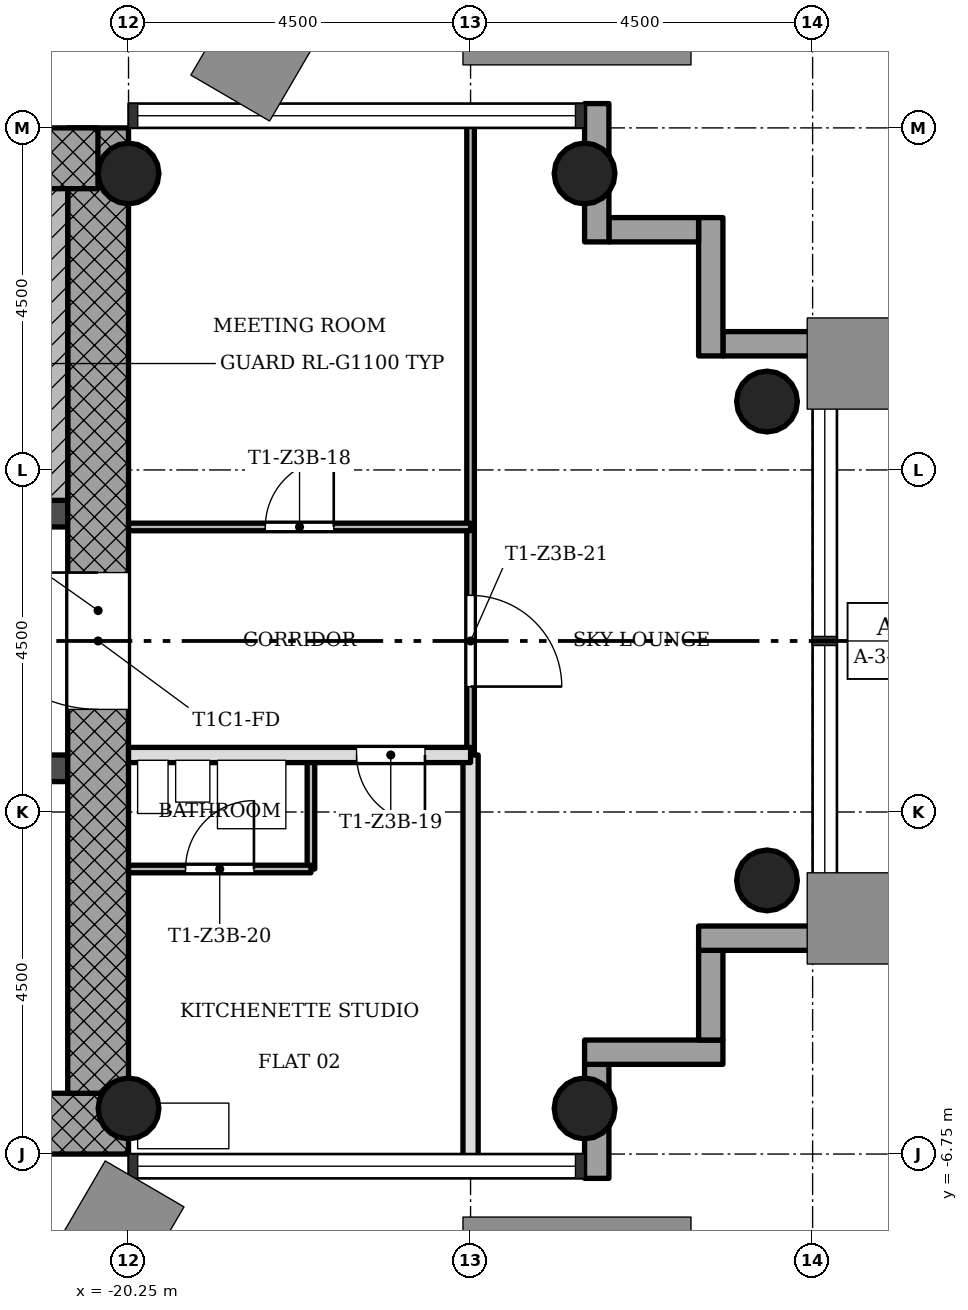
"""IFC4 building model, lengths in metres.
Left out: names, types, materials, properties, quantities, classifications, styles, units other than length and angle.
Written with IfcOpenShell. Run it as: python <this file> out.ifc"""

import sys

from ifc_helpers import new_model, si_unit, direction, frame, frame_2d, origin, origin_2d, place, context, subcontext, project, spatial, rectangle, hollow_circle, extrude, element, fill, save


model = new_model("IFC4")
c1 = context("Model", 3, precision=1e-05, world=origin(), true_north=direction((0.0, 1.0)))
c2 = subcontext(c1, "Body", "Model", "MODEL_VIEW")
j1 = project(units=[si_unit("LENGTHUNIT", "METRE"), si_unit("PLANEANGLEUNIT", "RADIAN")], contexts=[c1])
p1 = place(None, origin())
s1 = spatial("IfcSite", under=j1, at=p1, CompositionType="ELEMENT")
p2 = place(p1, origin())
s2 = spatial("IfcBuilding", under=s1, at=p2, CompositionType="ELEMENT")
p3 = place(p2, frame((0.0, 0.0, 143.9)))
s3 = spatial("IfcBuildingStorey", under=s2, at=p3, CompositionType="ELEMENT", Elevation=143.9)
p4 = place(p3, frame((-28.45, -6.35, 0.0), z_axis=(0.0, 0.0, 1.0), x_axis=(1.0, 0.0, 0.0)))
e1 = element("IfcWall", 1, at=p4, inside=s3, PredefinedType="SHEAR", context=c2, shape_type="SweptSolid", body=[
    extrude(rectangle(XDim=8.2, YDim=0.8, at=frame_2d((4.1, 0.0))), origin(), (0.0, 0.0, 1.0), 3.4),
])
p5 = place(p3, frame((-20.65, -5.95, 0.0), z_axis=(0.0, 0.0, 1.0), x_axis=(0.0, 1.0, 0.0)))
e2 = element("IfcWall", 2, at=p5, inside=s3, PredefinedType="SHEAR", context=c2, shape_type="SweptSolid", body=[
    extrude(rectangle(XDim=12.7, YDim=0.8, at=frame_2d((6.35, 0.0))), origin(), (0.0, 0.0, 1.0), 3.4),
])
p6 = place(p5, frame((5.05, 0.0, 0.0)))
e3 = element("IfcOpeningElement", 3, at=p6, cuts=e2, PredefinedType="OPENING", context=c2, shape_type="SweptSolid", body=[
    extrude(rectangle(XDim=1.8, YDim=2.1, at=frame_2d((0.9, 1.05))), frame((0.0, 0.41, 0.0), z_axis=(0.0, -1.0, 0.0), x_axis=(1.0, 0.0, 0.0)), (0.0, 0.0, 1.0), 0.82),
])
p7 = place(p3, frame((-20.652, 6.35, 0.0), z_axis=(0.0, 0.0, 1.0), x_axis=(-1.0, 0.0, 0.0)))
e4 = element("IfcWall", 4, at=p7, inside=s3, PredefinedType="SHEAR", context=c2, shape_type="SweptSolid", body=[
    extrude(rectangle(XDim=8.796, YDim=0.8, at=frame_2d((4.398, 0.0))), origin(), (0.0, 0.0, 1.0), 3.4),
])
p8 = place(p3, frame((-28.45, -1.675, 0.0), z_axis=(0.0, 0.0, 1.0), x_axis=(1.0, 0.0, 0.0)))
e5 = element("IfcWall", 5, at=p8, inside=s3, PredefinedType="SHEAR", context=c2, shape_type="SweptSolid", body=[
    extrude(rectangle(XDim=7.4, YDim=0.35, at=frame_2d((3.7, 0.0))), origin(), (0.0, 0.0, 1.0), 3.4),
])
p9 = place(p8, frame((0.95, 0.0, 0.0)))
e6 = element("IfcOpeningElement", 6, at=p9, cuts=e5, PredefinedType="OPENING", context=c2, shape_type="SweptSolid", body=[
    extrude(rectangle(XDim=1.1, YDim=2.1, at=frame_2d((0.55, 1.05))), frame((0.0, 0.185, 0.0), z_axis=(0.0, -1.0, 0.0), x_axis=(1.0, 0.0, 0.0)), (0.0, 0.0, 1.0), 0.37),
])
p10 = place(p8, frame((3.15, 0.0, 0.0)))
e7 = element("IfcOpeningElement", 7, at=p10, cuts=e5, PredefinedType="OPENING", context=c2, shape_type="SweptSolid", body=[
    extrude(rectangle(XDim=1.1, YDim=2.1, at=frame_2d((0.55, 1.05))), frame((0.0, 0.185, 0.0), z_axis=(0.0, -1.0, 0.0), x_axis=(1.0, 0.0, 0.0)), (0.0, 0.0, 1.0), 0.37),
])
p11 = place(p8, frame((5.35, 0.0, 0.0)))
e8 = element("IfcOpeningElement", 8, at=p11, cuts=e5, PredefinedType="OPENING", context=c2, shape_type="SweptSolid", body=[
    extrude(rectangle(XDim=1.1, YDim=2.1, at=frame_2d((0.55, 1.05))), frame((0.0, 0.185, 0.0), z_axis=(0.0, -1.0, 0.0), x_axis=(1.0, 0.0, 0.0)), (0.0, 0.0, 1.0), 0.37),
])
p12 = place(p3, frame((-28.45, 1.675, 0.0), z_axis=(0.0, 0.0, 1.0), x_axis=(1.0, 0.0, 0.0)))
e9 = element("IfcWall", 9, at=p12, inside=s3, PredefinedType="SHEAR", context=c2, shape_type="SweptSolid", body=[
    extrude(rectangle(XDim=7.4, YDim=0.35, at=frame_2d((3.7, 0.0))), origin(), (0.0, 0.0, 1.0), 3.4),
])
p13 = place(p12, frame((0.85, 0.0, 0.0)))
e10 = element("IfcOpeningElement", 10, at=p13, cuts=e9, PredefinedType="OPENING", context=c2, shape_type="SweptSolid", body=[
    extrude(rectangle(XDim=0.9, YDim=2.1, at=frame_2d((0.45, 1.05))), frame((0.0, 0.185, 0.0), z_axis=(0.0, -1.0, 0.0), x_axis=(1.0, 0.0, 0.0)), (0.0, 0.0, 1.0), 0.37),
])
for number, where, z_axis, x_axis in (
    (11, (-20.25, -6.15, 0.0), (0.0, 0.0, 1.0), (1.0, 0.0, 0.0)),
    (12, (-20.25, 6.15, 0.0), (0.0, 0.0, 1.0), (1.0, 0.0, 0.0)),
    (13, (-14.25, -6.15, 0.0), (0.0, 0.0, 1.0), (1.0, 0.0, 0.0)),
    (14, (-14.25, 6.15, 0.0), (0.0, 0.0, 1.0), (1.0, 0.0, 0.0)),
    (15, (-11.85, -3.15, 0.0), (0.0, 0.0, 1.0), (1.0, 0.0, 0.0)),
    (16, (-11.85, 3.15, 0.0), (0.0, 0.0, 1.0), (1.0, 0.0, 0.0)),
):
    element("IfcColumn", number, at=place(p3, frame(where, z_axis=z_axis, x_axis=x_axis)), inside=s3, PredefinedType="COLUMN", context=c2, shape_type="SweptSolid", body=[
        extrude(hollow_circle(Radius=0.4, WallThickness=0.028, at=origin_2d()), origin(), (0.0, 0.0, 1.0), 3.4),
    ])
p14 = place(p3, frame((-14.09, -7.07, -0.3), z_axis=(0.0, 0.0, 1.0), x_axis=(0.0, 1.0, 0.0)))
e17 = element("IfcWall", 17, at=p14, inside=s3, PredefinedType="STANDARD", context=c2, shape_type="SweptSolid", body=[
    extrude(rectangle(XDim=1.5, YDim=0.32, at=frame_2d((0.75, 0.0))), origin(), (0.0, 0.0, 1.0), 3.4),
])
p15 = place(p3, frame((-14.25, -5.41, -0.3), z_axis=(0.0, 0.0, 1.0), x_axis=(1.0, 0.0, 0.0)))
e18 = element("IfcWall", 18, at=p15, inside=s3, PredefinedType="STANDARD", context=c2, shape_type="SweptSolid", body=[
    extrude(rectangle(XDim=1.82, YDim=0.32, at=frame_2d((0.91, 0.0))), origin(), (0.0, 0.0, 1.0), 3.4),
])
p16 = place(p3, frame((-12.59, -5.25, -0.3), z_axis=(0.0, 0.0, 1.0), x_axis=(0.0, 1.0, 0.0)))
e19 = element("IfcWall", 19, at=p16, inside=s3, PredefinedType="STANDARD", context=c2, shape_type="SweptSolid", body=[
    extrude(rectangle(XDim=1.18, YDim=0.32, at=frame_2d((0.59, 0.0))), origin(), (0.0, 0.0, 1.0), 3.4),
])
p17 = place(p3, frame((-12.75, -3.91, -0.3), z_axis=(0.0, 0.0, 1.0), x_axis=(1.0, 0.0, 0.0)))
e20 = element("IfcWall", 20, at=p17, inside=s3, PredefinedType="STANDARD", context=c2, shape_type="SweptSolid", body=[
    extrude(rectangle(XDim=1.82, YDim=0.32, at=frame_2d((0.91, 0.0))), origin(), (0.0, 0.0, 1.0), 3.4),
])
p18 = place(p3, frame((-10.93, 3.91, -0.3), z_axis=(0.0, 0.0, 1.0), x_axis=(-1.0, 0.0, 0.0)))
e21 = element("IfcWall", 21, at=p18, inside=s3, PredefinedType="STANDARD", context=c2, shape_type="SweptSolid", body=[
    extrude(rectangle(XDim=1.5, YDim=0.32, at=frame_2d((0.75, 0.0))), origin(), (0.0, 0.0, 1.0), 3.4),
])
p19 = place(p3, frame((-12.59, 3.75, -0.3), z_axis=(0.0, 0.0, 1.0), x_axis=(0.0, 1.0, 0.0)))
e22 = element("IfcWall", 22, at=p19, inside=s3, PredefinedType="STANDARD", context=c2, shape_type="SweptSolid", body=[
    extrude(rectangle(XDim=1.82, YDim=0.32, at=frame_2d((0.91, 0.0))), origin(), (0.0, 0.0, 1.0), 3.4),
])
p20 = place(p3, frame((-12.75, 5.41, -0.3), z_axis=(0.0, 0.0, 1.0), x_axis=(-1.0, 0.0, 0.0)))
e23 = element("IfcWall", 23, at=p20, inside=s3, PredefinedType="STANDARD", context=c2, shape_type="SweptSolid", body=[
    extrude(rectangle(XDim=1.18, YDim=0.32, at=frame_2d((0.59, 0.0))), origin(), (0.0, 0.0, 1.0), 3.4),
])
p21 = place(p3, frame((-14.09, 5.25, -0.3), z_axis=(0.0, 0.0, 1.0), x_axis=(0.0, 1.0, 0.0)))
e24 = element("IfcWall", 24, at=p21, inside=s3, PredefinedType="STANDARD", context=c2, shape_type="SweptSolid", body=[
    extrude(rectangle(XDim=1.82, YDim=0.32, at=frame_2d((0.91, 0.0))), origin(), (0.0, 0.0, 1.0), 3.4),
])
p22 = place(p3, frame((-17.85, -3.0, 0.0), z_axis=(0.0, 0.0, 1.0), x_axis=(0.0, 1.0, 0.0)))
e25 = element("IfcWall", 25, at=p22, inside=s3, PredefinedType="PARTITIONING", context=c2, shape_type="SweptSolid", body=[
    extrude(rectangle(XDim=1.5, YDim=0.1, at=frame_2d((0.75, 0.0))), origin(), (0.0, 0.0, 1.0), 3.0),
])
p23 = place(p3, frame((-15.75, -1.5, 0.0), z_axis=(0.0, 0.0, 1.0), x_axis=(0.0, 1.0, 0.0)))
e26 = element("IfcWall", 26, at=p23, inside=s3, PredefinedType="PARTITIONING", context=c2, shape_type="SweptSolid", body=[
    extrude(rectangle(XDim=8.35, YDim=0.1, at=frame_2d((4.175, 0.0))), origin(), (0.0, 0.0, 1.0), 3.0),
])
p24 = place(p23, frame((0.9, 0.0, 0.0)))
e27 = element("IfcOpeningElement", 27, at=p24, cuts=e26, PredefinedType="OPENING", context=c2, shape_type="SweptSolid", body=[
    extrude(rectangle(XDim=1.2, YDim=2.1, at=frame_2d((0.6, 1.05))), frame((0.0, 0.06, 0.0), z_axis=(0.0, -1.0, 0.0), x_axis=(1.0, 0.0, 0.0)), (0.0, 0.0, 1.0), 0.12),
])
p25 = place(p3, frame((-15.75, -6.85, 0.0), z_axis=(0.0, 0.0, 1.0), x_axis=(0.0, 1.0, 0.0)))
e28 = element("IfcWall", 28, at=p25, inside=s3, PredefinedType="SOLIDWALL", context=c2, shape_type="SweptSolid", body=[
    extrude(rectangle(XDim=5.35, YDim=0.2, at=frame_2d((2.675, 0.0))), origin(), (0.0, 0.0, 1.0), 3.0),
])
p26 = place(p3, frame((-20.25, -3.0, 0.0), z_axis=(0.0, 0.0, 1.0), x_axis=(1.0, 0.0, 0.0)))
e29 = element("IfcWall", 29, at=p26, inside=s3, PredefinedType="PARTITIONING", context=c2, shape_type="SweptSolid", body=[
    extrude(rectangle(XDim=2.4, YDim=0.1, at=frame_2d((1.2, 0.0))), origin(), (0.0, 0.0, 1.0), 3.0),
])
p27 = place(p26, frame((0.75, 0.0, 0.0)))
e30 = element("IfcOpeningElement", 30, at=p27, cuts=e29, PredefinedType="OPENING", context=c2, shape_type="SweptSolid", body=[
    extrude(rectangle(XDim=0.9, YDim=2.1, at=frame_2d((0.45, 1.05))), frame((0.0, 0.06, 0.0), z_axis=(0.0, -1.0, 0.0), x_axis=(1.0, 0.0, 0.0)), (0.0, 0.0, 1.0), 0.12),
])
p28 = place(p3, frame((-20.25, -1.5, 0.0), z_axis=(0.0, 0.0, 1.0), x_axis=(1.0, 0.0, 0.0)))
e31 = element("IfcWall", 31, at=p28, inside=s3, PredefinedType="SOLIDWALL", context=c2, shape_type="SweptSolid", body=[
    extrude(rectangle(XDim=4.5, YDim=0.2, at=frame_2d((2.25, 0.0))), origin(), (0.0, 0.0, 1.0), 3.0),
])
p29 = place(p28, frame((3.0, 0.0, 0.0)))
e32 = element("IfcOpeningElement", 32, at=p29, cuts=e31, PredefinedType="OPENING", context=c2, shape_type="SweptSolid", body=[
    extrude(rectangle(XDim=0.9, YDim=2.1, at=frame_2d((0.45, 1.05))), frame((0.0, 0.11, 0.0), z_axis=(0.0, -1.0, 0.0), x_axis=(1.0, 0.0, 0.0)), (0.0, 0.0, 1.0), 0.22),
])
p30 = place(p3, frame((-20.25, 1.5, 0.0), z_axis=(0.0, 0.0, 1.0), x_axis=(1.0, 0.0, 0.0)))
e33 = element("IfcWall", 33, at=p30, inside=s3, PredefinedType="PARTITIONING", context=c2, shape_type="SweptSolid", body=[
    extrude(rectangle(XDim=4.5, YDim=0.1, at=frame_2d((2.25, 0.0))), origin(), (0.0, 0.0, 1.0), 3.0),
])
p31 = place(p30, frame((1.8, 0.0, 0.0)))
e34 = element("IfcOpeningElement", 34, at=p31, cuts=e33, PredefinedType="OPENING", context=c2, shape_type="SweptSolid", body=[
    extrude(rectangle(XDim=0.9, YDim=2.1, at=frame_2d((0.45, 1.05))), frame((0.0, 0.06, 0.0), z_axis=(0.0, -1.0, 0.0), x_axis=(1.0, 0.0, 0.0)), (0.0, 0.0, 1.0), 0.12),
])
p32 = place(p3, frame((-21.25, 1.85, 0.0), z_axis=(0.0, 0.0, 1.0), x_axis=(0.0, 1.0, 0.0)))
e35 = element("IfcWall", 35, at=p32, inside=s3, PredefinedType="SHEAR", context=c2, shape_type="SweptSolid", body=[
    extrude(rectangle(XDim=4.1, YDim=0.4, at=frame_2d((2.05, 0.0))), origin(), (0.0, 0.0, 1.0), 3.4),
])
p33 = place(p31, origin())
e36 = element("IfcDoor", 36, at=p33, inside=s3, OperationType="SINGLE_SWING_LEFT", PredefinedType="DOOR", context=c2, shape_type="SweptSolid", body=[
    extrude(rectangle(XDim=0.9, YDim=2.1, at=frame_2d((0.45, 1.05))), frame((0.0, 0.025, 0.0), z_axis=(0.0, -1.0, 0.0), x_axis=(1.0, 0.0, 0.0)), (0.0, 0.0, 1.0), 0.05),
])
fill(e34, e36)
p34 = place(p29, origin())
e37 = element("IfcDoor", 37, at=p34, inside=s3, OperationType="SINGLE_SWING_RIGHT", PredefinedType="DOOR", context=c2, shape_type="SweptSolid", body=[
    extrude(rectangle(XDim=0.9, YDim=2.1, at=frame_2d((0.45, 1.05))), frame((0.0, 0.025, 0.0), z_axis=(0.0, -1.0, 0.0), x_axis=(1.0, 0.0, 0.0)), (0.0, 0.0, 1.0), 0.05),
])
fill(e32, e37)
p35 = place(p27, origin())
e38 = element("IfcDoor", 38, at=p35, inside=s3, OperationType="SINGLE_SWING_LEFT", PredefinedType="DOOR", context=c2, shape_type="SweptSolid", body=[
    extrude(rectangle(XDim=0.9, YDim=2.1, at=frame_2d((0.45, 1.05))), frame((0.0, 0.025, 0.0), z_axis=(0.0, -1.0, 0.0), x_axis=(1.0, 0.0, 0.0)), (0.0, 0.0, 1.0), 0.05),
])
fill(e30, e38)
p36 = place(p24, origin())
e39 = element("IfcDoor", 39, at=p36, inside=s3, OperationType="SINGLE_SWING_LEFT", PredefinedType="DOOR", context=c2, shape_type="SweptSolid", body=[
    extrude(rectangle(XDim=1.2, YDim=2.1, at=frame_2d((0.6, 1.05))), frame((0.0, 0.025, 0.0), z_axis=(0.0, -1.0, 0.0), x_axis=(1.0, 0.0, 0.0)), (0.0, 0.0, 1.0), 0.05),
])
fill(e27, e39)
p37 = place(p6, origin())
e40 = element("IfcDoor", 40, at=p37, inside=s3, OperationType="SINGLE_SWING_LEFT", PredefinedType="DOOR", context=c2, shape_type="SweptSolid", body=[
    extrude(rectangle(XDim=1.8, YDim=2.1, at=frame_2d((0.9, 1.05))), frame((0.0, 0.025, 0.0), z_axis=(0.0, -1.0, 0.0), x_axis=(1.0, 0.0, 0.0)), (0.0, 0.0, 1.0), 0.05),
])
fill(e3, e40)
save(model, sys.argv[1])
